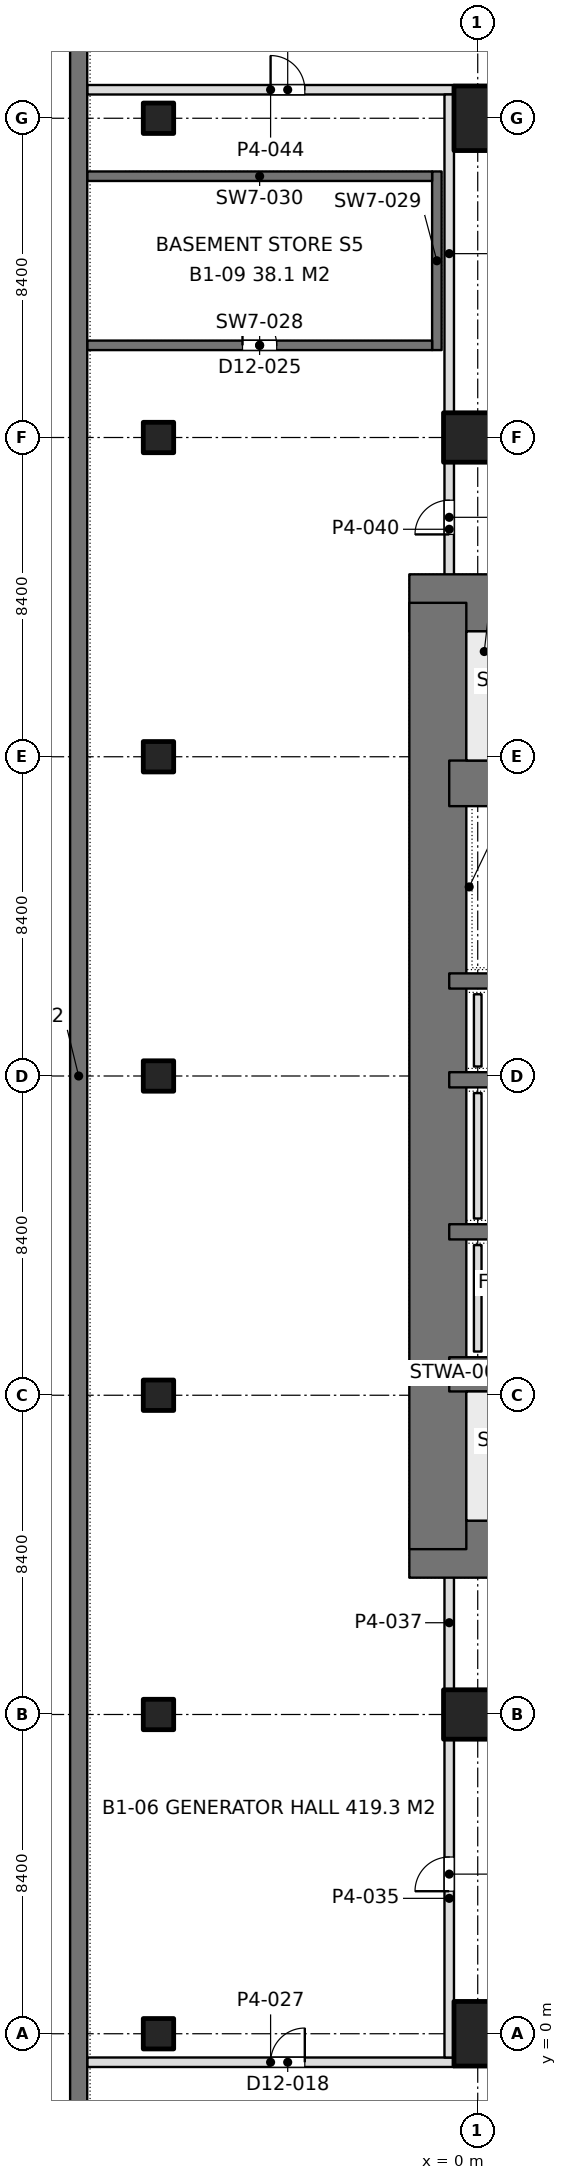
"""IFC4 building model, lengths in metres.
Left out: names, types, materials, properties, quantities, classifications, styles, units other than length and angle.
Written with IfcOpenShell. Run it as: python <this file> out.ifc"""

import sys

from ifc_helpers import new_model, si_unit, direction, frame, frame_2d, origin, origin_with_axes, origin_2d, place, context, subcontext, project, spatial, rectangle, extrude, element, fill, save


model = new_model("IFC4")
c1 = context("Model", 3, precision=1e-05, world=origin(), true_north=direction((0.0, 1.0)))
c2 = subcontext(c1, "Body", "Model", "MODEL_VIEW")
j1 = project(units=[si_unit("LENGTHUNIT", "METRE"), si_unit("PLANEANGLEUNIT", "RADIAN")], contexts=[c1])
p1 = place(None, origin())
s1 = spatial("IfcSite", under=j1, at=p1, CompositionType="ELEMENT")
p2 = place(p1, origin())
s2 = spatial("IfcBuilding", under=s1, at=p2, CompositionType="ELEMENT")
p3 = place(p2, frame((0.0, 0.0, -4.2)))
s3 = spatial("IfcBuildingStorey", under=s2, at=p3, CompositionType="ELEMENT", Elevation=-4.2)
p4 = place(p3, frame((-10.5, -10.5, 0.0), z_axis=(0.0, 0.0, 1.0), x_axis=(0.0, 1.0, 0.0)))
e1 = element("IfcWall", 1, at=p4, inside=s3, PredefinedType="SOLIDWALL", context=c2, shape_type="SweptSolid", body=[
    extrude(rectangle(XDim=71.4, YDim=0.45, at=frame_2d((35.7, 0.0))), origin(), (0.0, 0.0, 1.0), 4.2),
])
for number, where, z_axis, x_axis in (
    (2, (-8.4, 0.0, 0.0), (0.0, 0.0, 1.0), (1.0, 0.0, 0.0)),
    (3, (-8.4, 8.4, 0.0), (0.0, 0.0, 1.0), (1.0, 0.0, 0.0)),
    (4, (-8.4, 16.8, 0.0), (0.0, 0.0, 1.0), (1.0, 0.0, 0.0)),
    (5, (-8.4, 25.2, 0.0), (0.0, 0.0, 1.0), (1.0, 0.0, 0.0)),
    (6, (-8.4, 33.6, 0.0), (0.0, 0.0, 1.0), (1.0, 0.0, 0.0)),
    (7, (-8.4, 42.0, 0.0), (0.0, 0.0, 1.0), (1.0, 0.0, 0.0)),
    (8, (-8.4, 50.4, 0.0), (0.0, 0.0, 1.0), (1.0, 0.0, 0.0)),
):
    element("IfcColumn", number, at=place(p3, frame(where, z_axis=z_axis, x_axis=x_axis)), inside=s3, PredefinedType="COLUMN", context=c2, shape_type="SweptSolid", body=[
        extrude(rectangle(XDim=0.8, YDim=0.8, at=origin_2d()), origin(), (0.0, 0.0, 1.0), 4.2),
    ])
p5 = place(p3, origin_with_axes())
e9 = element("IfcColumn", 9, at=p5, inside=s3, PredefinedType="COLUMN", context=c2, shape_type="SweptSolid", body=[
    extrude(rectangle(XDim=1.25, YDim=1.7, at=origin_2d()), origin(), (0.0, 0.0, 1.0), 4.2),
])
for number, where, z_axis, x_axis in (
    (10, (0.0, 8.4, 0.0), (0.0, 0.0, 1.0), (0.0, 1.0, 0.0)),
    (11, (0.0, 42.0, 0.0), (0.0, 0.0, 1.0), (0.0, 1.0, 0.0)),
):
    element("IfcColumn", number, at=place(p3, frame(where, z_axis=z_axis, x_axis=x_axis)), inside=s3, PredefinedType="COLUMN", context=c2, shape_type="SweptSolid", body=[
        extrude(rectangle(XDim=1.3, YDim=1.8, at=origin_2d()), origin(), (0.0, 0.0, 1.0), 4.2),
    ])
p6 = place(p3, frame((0.0, 50.4, 0.0), z_axis=(0.0, 0.0, 1.0), x_axis=(1.0, 0.0, 0.0)))
e12 = element("IfcColumn", 12, at=p6, inside=s3, PredefinedType="COLUMN", context=c2, shape_type="SweptSolid", body=[
    extrude(rectangle(XDim=1.25, YDim=1.7, at=origin_2d()), origin(), (0.0, 0.0, 1.0), 4.2),
])
p7 = place(p3, frame((-1.8, 12.75, 0.0), z_axis=(0.0, 0.0, 1.0), x_axis=(1.0, 0.0, 0.0)))
e13 = element("IfcWall", 13, at=p7, inside=s3, PredefinedType="SHEAR", context=c2, shape_type="SweptSolid", body=[
    extrude(rectangle(XDim=19.2, YDim=1.5, at=frame_2d((9.6, 0.0))), origin(), (0.0, 0.0, 1.0), 4.2),
])
p8 = place(p7, frame((9.55, 0.0, 0.0)))
e14 = element("IfcOpeningElement", 14, at=p8, cuts=e13, PredefinedType="OPENING", context=c2, shape_type="SweptSolid", body=[
    extrude(rectangle(XDim=1.8, YDim=2.4, at=frame_2d((0.9, 1.2))), frame((0.0, 0.76, 0.0), z_axis=(0.0, -1.0, 0.0), x_axis=(1.0, 0.0, 0.0)), (0.0, 0.0, 1.0), 1.52),
])
p9 = place(p3, frame((-1.8, 37.65, 0.0), z_axis=(0.0, 0.0, 1.0), x_axis=(1.0, 0.0, 0.0)))
e15 = element("IfcWall", 15, at=p9, inside=s3, PredefinedType="SHEAR", context=c2, shape_type="SweptSolid", body=[
    extrude(rectangle(XDim=19.2, YDim=1.5, at=frame_2d((9.6, 0.0))), origin(), (0.0, 0.0, 1.0), 4.2),
])
p10 = place(p9, frame((9.55, 0.0, 0.0)))
e16 = element("IfcOpeningElement", 16, at=p10, cuts=e15, PredefinedType="OPENING", context=c2, shape_type="SweptSolid", body=[
    extrude(rectangle(XDim=1.8, YDim=2.4, at=frame_2d((0.9, 1.2))), frame((0.0, 0.76, 0.0), z_axis=(0.0, -1.0, 0.0), x_axis=(1.0, 0.0, 0.0)), (0.0, 0.0, 1.0), 1.52),
])
p11 = place(p3, frame((-1.05, 12.75, 0.0), z_axis=(0.0, 0.0, 1.0), x_axis=(0.0, 1.0, 0.0)))
e17 = element("IfcWall", 17, at=p11, inside=s3, PredefinedType="SHEAR", context=c2, shape_type="SweptSolid", body=[
    extrude(rectangle(XDim=24.9, YDim=1.5, at=frame_2d((12.45, 0.0))), origin(), (0.0, 0.0, 1.0), 4.2),
])
p12 = place(p3, frame((-0.75, 17.35, 0.0), z_axis=(0.0, 0.0, 1.0), x_axis=(1.0, 0.0, 0.0)))
e18 = element("IfcWall", 18, at=p12, inside=s3, PredefinedType="SHEAR", context=c2, shape_type="SweptSolid", body=[
    extrude(rectangle(XDim=7.65, YDim=0.9, at=frame_2d((3.825, 0.0))), origin(), (0.0, 0.0, 1.0), 4.2),
])
for number, where, z_axis, x_axis in (
    (19, (-0.75, 21.1, 0.0), (0.0, 0.0, 1.0), (1.0, 0.0, 0.0)),
    (20, (-0.75, 25.1, 0.0), (0.0, 0.0, 1.0), (1.0, 0.0, 0.0)),
    (21, (-0.75, 27.7, 0.0), (0.0, 0.0, 1.0), (1.0, 0.0, 0.0)),
):
    element("IfcWall", number, at=place(p3, frame(where, z_axis=z_axis, x_axis=x_axis)), inside=s3, PredefinedType="SHEAR", context=c2, shape_type="SweptSolid", body=[
        extrude(rectangle(XDim=7.65, YDim=0.4, at=frame_2d((3.825, 0.0))), origin(), (0.0, 0.0, 1.0), 4.2),
    ])
p13 = place(p3, frame((-0.75, 32.9, 0.0), z_axis=(0.0, 0.0, 1.0), x_axis=(1.0, 0.0, 0.0)))
e22 = element("IfcWall", 22, at=p13, inside=s3, PredefinedType="SHEAR", context=c2, shape_type="SweptSolid", body=[
    extrude(rectangle(XDim=4.45, YDim=1.2, at=frame_2d((2.225, 0.0))), origin(), (0.0, 0.0, 1.0), 4.2),
])
p14 = place(p3, frame((-10.276, -0.75, 0.0), z_axis=(0.0, 0.0, 1.0), x_axis=(1.0, 0.0, 0.0)))
e23 = element("IfcWall", 23, at=p14, inside=s3, PredefinedType="PARTITIONING", context=c2, shape_type="SweptSolid", body=[
    extrude(rectangle(XDim=9.652, YDim=0.25, at=frame_2d((4.826, 0.0))), origin(), (0.0, 0.0, 1.0), 3.8),
])
p15 = place(p14, frame((4.826, 0.0, 0.0)))
e24 = element("IfcOpeningElement", 24, at=p15, cuts=e23, PredefinedType="OPENING", context=c2, shape_type="SweptSolid", body=[
    extrude(rectangle(XDim=0.9, YDim=2.2, at=frame_2d((0.45, 1.1))), frame((0.0, 0.135, 0.0), z_axis=(0.0, -1.0, 0.0), x_axis=(1.0, 0.0, 0.0)), (0.0, 0.0, 1.0), 0.27),
])
p16 = place(p3, frame((-10.276, 51.15, 0.0), z_axis=(0.0, 0.0, 1.0), x_axis=(1.0, 0.0, 0.0)))
e25 = element("IfcWall", 25, at=p16, inside=s3, PredefinedType="PARTITIONING", context=c2, shape_type="SweptSolid", body=[
    extrude(rectangle(XDim=9.652, YDim=0.25, at=frame_2d((4.826, 0.0))), origin(), (0.0, 0.0, 1.0), 3.8),
])
p17 = place(p16, frame((4.826, 0.0, 0.0)))
e26 = element("IfcOpeningElement", 26, at=p17, cuts=e25, PredefinedType="OPENING", context=c2, shape_type="SweptSolid", body=[
    extrude(rectangle(XDim=0.9, YDim=2.2, at=frame_2d((0.45, 1.1))), frame((0.0, 0.135, 0.0), z_axis=(0.0, -1.0, 0.0), x_axis=(1.0, 0.0, 0.0)), (0.0, 0.0, 1.0), 0.27),
])
p18 = place(p3, frame((-0.75, -0.626, 0.0), z_axis=(0.0, 0.0, 1.0), x_axis=(0.0, 1.0, 0.0)))
e27 = element("IfcWall", 27, at=p18, inside=s3, PredefinedType="PARTITIONING", context=c2, shape_type="SweptSolid", body=[
    extrude(rectangle(XDim=8.377, YDim=0.25, at=frame_2d((4.188, 0.0))), origin(), (0.0, 0.0, 1.0), 3.8),
])
p19 = place(p18, frame((4.376, 0.0, 0.0)))
e28 = element("IfcOpeningElement", 28, at=p19, cuts=e27, PredefinedType="OPENING", context=c2, shape_type="SweptSolid", body=[
    extrude(rectangle(XDim=0.9, YDim=2.2, at=frame_2d((0.45, 1.1))), frame((0.0, 0.135, 0.0), z_axis=(0.0, -1.0, 0.0), x_axis=(1.0, 0.0, 0.0)), (0.0, 0.0, 1.0), 0.27),
])
p20 = place(p3, frame((-0.75, 9.049, 0.0), z_axis=(0.0, 0.0, 1.0), x_axis=(0.0, 1.0, 0.0)))
e29 = element("IfcWall", 29, at=p20, inside=s3, PredefinedType="PARTITIONING", context=c2, shape_type="SweptSolid", body=[
    extrude(rectangle(XDim=3.531, YDim=0.25, at=frame_2d((1.766, 0.0))), origin(), (0.0, 0.0, 1.0), 3.8),
])
p21 = place(p3, frame((-0.75, 37.82, 0.0), z_axis=(0.0, 0.0, 1.0), x_axis=(0.0, 1.0, 0.0)))
e30 = element("IfcWall", 30, at=p21, inside=s3, PredefinedType="PARTITIONING", context=c2, shape_type="SweptSolid", body=[
    extrude(rectangle(XDim=3.531, YDim=0.25, at=frame_2d((1.766, 0.0))), origin(), (0.0, 0.0, 1.0), 3.8),
])
p22 = place(p21, frame((1.63, 0.0, 0.0)))
e31 = element("IfcOpeningElement", 31, at=p22, cuts=e30, PredefinedType="OPENING", context=c2, shape_type="SweptSolid", body=[
    extrude(rectangle(XDim=0.9, YDim=2.2, at=frame_2d((0.45, 1.1))), frame((0.0, 0.135, 0.0), z_axis=(0.0, -1.0, 0.0), x_axis=(1.0, 0.0, 0.0)), (0.0, 0.0, 1.0), 0.27),
])
p23 = place(p3, frame((-0.75, 42.649, 0.0), z_axis=(0.0, 0.0, 1.0), x_axis=(0.0, 1.0, 0.0)))
e32 = element("IfcWall", 32, at=p23, inside=s3, PredefinedType="PARTITIONING", context=c2, shape_type="SweptSolid", body=[
    extrude(rectangle(XDim=8.377, YDim=0.25, at=frame_2d((4.188, 0.0))), origin(), (0.0, 0.0, 1.0), 3.8),
])
p24 = place(p3, frame((0.0, 17.95, 0.0), z_axis=(0.0, 0.0, 1.0), x_axis=(0.0, 1.0, 0.0)))
e33 = element("IfcWall", 33, at=p24, inside=s3, PredefinedType="PLUMBINGWALL", context=c2, shape_type="SweptSolid", body=[
    extrude(rectangle(XDim=2.8, YDim=0.2, at=frame_2d((1.4, 0.0))), origin(), (0.0, 0.0, 1.0), 1.2),
])
p25 = place(p3, frame((0.0, 21.45, 0.0), z_axis=(0.0, 0.0, 1.0), x_axis=(0.0, 1.0, 0.0)))
e34 = element("IfcWall", 34, at=p25, inside=s3, PredefinedType="PLUMBINGWALL", context=c2, shape_type="SweptSolid", body=[
    extrude(rectangle(XDim=3.3, YDim=0.2, at=frame_2d((1.65, 0.0))), origin(), (0.0, 0.0, 1.0), 1.2),
])
p26 = place(p3, frame((0.0, 25.45, 0.0), z_axis=(0.0, 0.0, 1.0), x_axis=(0.0, 1.0, 0.0)))
e35 = element("IfcWall", 35, at=p26, inside=s3, PredefinedType="PLUMBINGWALL", context=c2, shape_type="SweptSolid", body=[
    extrude(rectangle(XDim=1.9, YDim=0.2, at=frame_2d((0.95, 0.0))), origin(), (0.0, 0.0, 1.0), 1.2),
])
p27 = place(p3, frame((-10.277, 44.425, 0.0), z_axis=(0.0, 0.0, 1.0), x_axis=(1.0, 0.0, 0.0)))
e36 = element("IfcWall", 36, at=p27, inside=s3, PredefinedType="SOLIDWALL", context=c2, shape_type="SweptSolid", body=[
    extrude(rectangle(XDim=9.077, YDim=0.25, at=frame_2d((4.539, 0.0))), origin(), (0.0, 0.0, 1.0), 4.2),
])
p28 = place(p27, frame((4.087, 0.0, 0.0)))
e37 = element("IfcOpeningElement", 37, at=p28, cuts=e36, PredefinedType="OPENING", context=c2, shape_type="SweptSolid", body=[
    extrude(rectangle(XDim=0.9, YDim=2.2, at=frame_2d((0.45, 1.1))), frame((0.0, 0.135, 0.0), z_axis=(0.0, -1.0, 0.0), x_axis=(1.0, 0.0, 0.0)), (0.0, 0.0, 1.0), 0.27),
])
p29 = place(p3, frame((-10.277, 48.875, 0.0), z_axis=(0.0, 0.0, 1.0), x_axis=(1.0, 0.0, 0.0)))
e38 = element("IfcWall", 38, at=p29, inside=s3, PredefinedType="SOLIDWALL", context=c2, shape_type="SweptSolid", body=[
    extrude(rectangle(XDim=9.077, YDim=0.25, at=frame_2d((4.539, 0.0))), origin(), (0.0, 0.0, 1.0), 4.2),
])
p30 = place(p3, frame((-1.075, 44.3, 0.0), z_axis=(0.0, 0.0, 1.0), x_axis=(0.0, 1.0, 0.0)))
e39 = element("IfcWall", 39, at=p30, inside=s3, PredefinedType="SOLIDWALL", context=c2, shape_type="SweptSolid", body=[
    extrude(rectangle(XDim=4.7, YDim=0.25, at=frame_2d((2.35, 0.0))), origin(), (0.0, 0.0, 1.0), 4.2),
])
p31 = place(p15, origin())
e40 = element("IfcDoor", 40, at=p31, inside=s3, OperationType="SINGLE_SWING_RIGHT", PredefinedType="DOOR", context=c2, shape_type="SweptSolid", body=[
    extrude(rectangle(XDim=0.9, YDim=2.2, at=frame_2d((0.45, 1.1))), frame((0.0, 0.025, 0.0), z_axis=(0.0, -1.0, 0.0), x_axis=(1.0, 0.0, 0.0)), (0.0, 0.0, 1.0), 0.05),
])
fill(e24, e40)
p32 = place(p17, origin())
e41 = element("IfcDoor", 41, at=p32, inside=s3, OperationType="SINGLE_SWING_LEFT", PredefinedType="DOOR", context=c2, shape_type="SweptSolid", body=[
    extrude(rectangle(XDim=0.9, YDim=2.2, at=frame_2d((0.45, 1.1))), frame((0.0, 0.025, 0.0), z_axis=(0.0, -1.0, 0.0), x_axis=(1.0, 0.0, 0.0)), (0.0, 0.0, 1.0), 0.05),
])
fill(e26, e41)
p33 = place(p19, origin())
e42 = element("IfcDoor", 42, at=p33, inside=s3, OperationType="SINGLE_SWING_LEFT", PredefinedType="DOOR", context=c2, shape_type="SweptSolid", body=[
    extrude(rectangle(XDim=0.9, YDim=2.2, at=frame_2d((0.45, 1.1))), frame((0.0, 0.025, 0.0), z_axis=(0.0, -1.0, 0.0), x_axis=(1.0, 0.0, 0.0)), (0.0, 0.0, 1.0), 0.05),
])
fill(e28, e42)
p34 = place(p22, origin())
e43 = element("IfcDoor", 43, at=p34, inside=s3, OperationType="SINGLE_SWING_LEFT", PredefinedType="DOOR", context=c2, shape_type="SweptSolid", body=[
    extrude(rectangle(XDim=0.9, YDim=2.2, at=frame_2d((0.45, 1.1))), frame((0.0, 0.025, 0.0), z_axis=(0.0, -1.0, 0.0), x_axis=(1.0, 0.0, 0.0)), (0.0, 0.0, 1.0), 0.05),
])
fill(e31, e43)
p35 = place(p28, origin())
e44 = element("IfcDoor", 44, at=p35, inside=s3, OperationType="SINGLE_SWING_LEFT", PredefinedType="DOOR", context=c2, shape_type="SweptSolid", body=[
    extrude(rectangle(XDim=0.9, YDim=2.2, at=frame_2d((0.45, 1.1))), frame((0.0, 0.025, 0.0), z_axis=(0.0, -1.0, 0.0), x_axis=(1.0, 0.0, 0.0)), (0.0, 0.0, 1.0), 0.05),
])
fill(e37, e44)
save(model, sys.argv[1])
